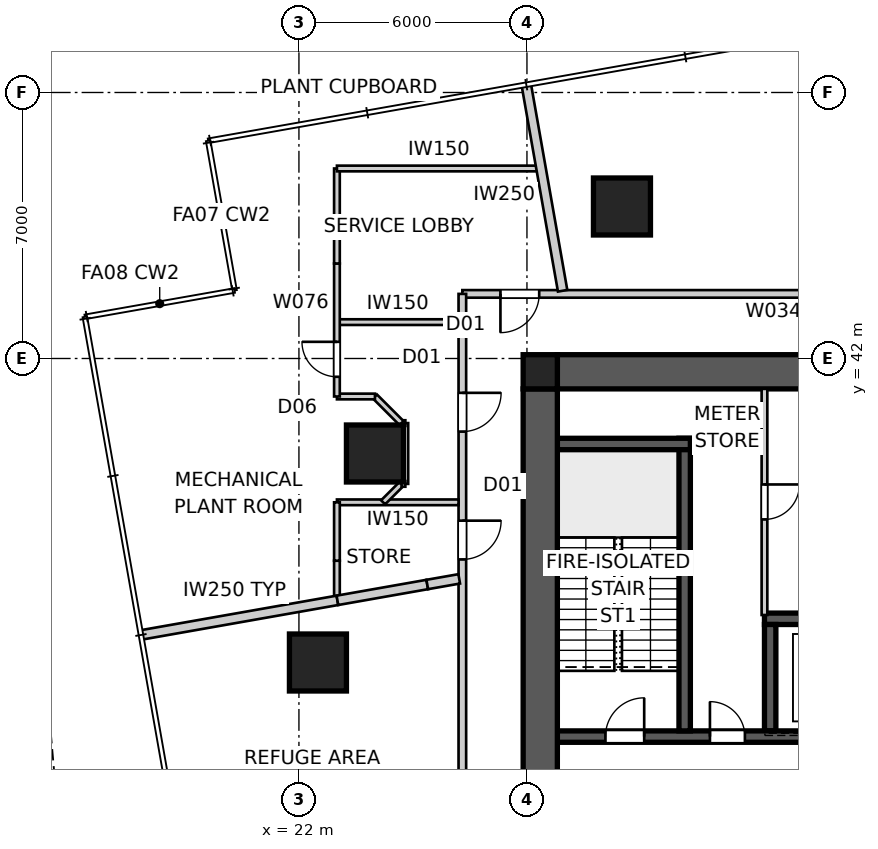
"""IFC4 building model, lengths in metres.
Left out: names, types, materials, properties, quantities, classifications, styles, units other than length and angle.
Written with IfcOpenShell. Run it as: python <this file> out.ifc"""

import sys

from ifc_helpers import new_model, si_unit, direction, frame, frame_2d, origin, origin_2d, place, context, subcontext, project, spatial, polyline, rectangle, outline, extrude, element, fill, save


model = new_model("IFC4")
c1 = context("Model", 3, precision=1e-05, world=origin(), true_north=direction((0.0, 1.0)))
c2 = subcontext(c1, "Body", "Model", "MODEL_VIEW")
j1 = project(units=[si_unit("LENGTHUNIT", "METRE"), si_unit("PLANEANGLEUNIT", "RADIAN")], contexts=[c1])
p1 = place(None, origin())
s1 = spatial("IfcSite", under=j1, at=p1, CompositionType="ELEMENT")
p2 = place(p1, origin())
s2 = spatial("IfcBuilding", under=s1, at=p2, CompositionType="ELEMENT")
p3 = place(p2, frame((0.0, 0.0, 74.4)))
s3 = spatial("IfcBuildingStorey", under=s2, at=p3, CompositionType="ELEMENT", Elevation=74.4)
p4 = place(p3, frame((28.8, 41.65, 0.0), z_axis=(0.0, 0.0, 1.0), x_axis=(1.0, 0.0, 0.0)))
e1 = element("IfcWall", 1, at=p4, inside=s3, PredefinedType="SHEAR", context=c2, shape_type="SweptSolid", body=[
    extrude(outline(polyline([(0.0, -0.45), (22.4, -0.45), (22.4, -0.025), (22.85, -0.025), (22.85, 0.025), (22.4, 0.025), (22.4, 0.45), (0.0, 0.45), (0.0, 0.025), (-0.45, 0.025), (-0.45, -0.025), (0.0, -0.025), (0.0, -0.45)])), origin(), (0.0, 0.0, 1.0), 5.0),
])
p5 = place(p3, frame((28.35, 41.2, 0.0), z_axis=(0.0, 0.0, 1.0), x_axis=(0.0, -1.0, 0.0)))
e2 = element("IfcWall", 2, at=p5, inside=s3, PredefinedType="SHEAR", context=c2, shape_type="SweptSolid", body=[
    extrude(outline(polyline([(0.0, -0.45), (22.4, -0.45), (22.4, -0.025), (22.85, -0.025), (22.85, 0.025), (22.4, 0.025), (22.4, 0.45), (0.0, 0.45), (0.0, 0.025), (-0.45, 0.025), (-0.45, -0.025), (0.0, -0.025), (0.0, -0.45)])), origin(), (0.0, 0.0, 1.0), 5.0),
])
p6 = place(p5, frame((11.14, 0.0, 0.0)))
e3 = element("IfcOpeningElement", 3, at=p6, cuts=e2, PredefinedType="OPENING", context=c2, shape_type="SweptSolid", body=[
    extrude(rectangle(XDim=1.02, YDim=2.4, at=frame_2d((0.51, 1.2))), frame((0.0, 0.46, 0.0), z_axis=(0.0, -1.0, 0.0), x_axis=(1.0, 0.0, 0.0)), (0.0, 0.0, 1.0), 0.92),
])
p7 = place(p3, frame((28.8, 32.05, 0.0), z_axis=(0.0, 0.0, 1.0), x_axis=(1.0, 0.0, 0.0)))
e4 = element("IfcWall", 4, at=p7, inside=s3, PredefinedType="SHEAR", context=c2, shape_type="SweptSolid", body=[
    extrude(rectangle(XDim=22.4, YDim=0.3, at=frame_2d((11.2, 0.0))), origin(), (0.0, 0.0, 1.0), 5.0),
])
p8 = place(p7, frame((19.04, 0.0, 0.0)))
e5 = element("IfcOpeningElement", 5, at=p8, cuts=e4, PredefinedType="OPENING", context=c2, shape_type="SweptSolid", body=[
    extrude(rectangle(XDim=0.92, YDim=2.1, at=frame_2d((0.46, 1.05))), frame((0.0, 0.16, 0.0), z_axis=(0.0, -1.0, 0.0), x_axis=(1.0, 0.0, 0.0)), (0.0, 0.0, 1.0), 0.32),
])
p9 = place(p7, frame((1.265, 0.0, 0.0)))
e6 = element("IfcOpeningElement", 6, at=p9, cuts=e4, PredefinedType="OPENING", context=c2, shape_type="SweptSolid", body=[
    extrude(rectangle(XDim=1.02, YDim=2.1, at=frame_2d((0.51, 1.05))), frame((0.0, 0.16, 0.0), z_axis=(0.0, -1.0, 0.0), x_axis=(1.0, 0.0, 0.0)), (0.0, 0.0, 1.0), 0.32),
])
p10 = place(p7, frame((4.015, 0.0, 0.0)))
e7 = element("IfcOpeningElement", 7, at=p10, cuts=e4, PredefinedType="OPENING", context=c2, shape_type="SweptSolid", body=[
    extrude(rectangle(XDim=0.92, YDim=2.1, at=frame_2d((0.46, 1.05))), frame((0.0, 0.16, 0.0), z_axis=(0.0, -1.0, 0.0), x_axis=(1.0, 0.0, 0.0)), (0.0, 0.0, 1.0), 0.32),
])
p11 = place(p7, frame((6.45, 0.0, 0.0)))
e8 = element("IfcOpeningElement", 8, at=p11, cuts=e4, PredefinedType="OPENING", context=c2, shape_type="SweptSolid", body=[
    extrude(rectangle(XDim=1.1, YDim=2.1, at=frame_2d((0.55, 1.05))), frame((0.0, 0.16, 0.0), z_axis=(0.0, -1.0, 0.0), x_axis=(1.0, 0.0, 0.0)), (0.0, 0.0, 1.0), 0.32),
])
p12 = place(p7, frame((9.25, 0.0, 0.0)))
e9 = element("IfcOpeningElement", 9, at=p12, cuts=e4, PredefinedType="OPENING", context=c2, shape_type="SweptSolid", body=[
    extrude(rectangle(XDim=1.1, YDim=2.1, at=frame_2d((0.55, 1.05))), frame((0.0, 0.16, 0.0), z_axis=(0.0, -1.0, 0.0), x_axis=(1.0, 0.0, 0.0)), (0.0, 0.0, 1.0), 0.32),
])
p13 = place(p7, frame((14.85, 0.0, 0.0)))
e10 = element("IfcOpeningElement", 10, at=p13, cuts=e4, PredefinedType="OPENING", context=c2, shape_type="SweptSolid", body=[
    extrude(rectangle(XDim=1.1, YDim=2.1, at=frame_2d((0.55, 1.05))), frame((0.0, 0.16, 0.0), z_axis=(0.0, -1.0, 0.0), x_axis=(1.0, 0.0, 0.0)), (0.0, 0.0, 1.0), 0.32),
])
p14 = place(p3, frame((34.25, 35.15, 0.0), z_axis=(0.0, 0.0, 1.0), x_axis=(1.0, 0.0, 0.0)))
e11 = element("IfcWall", 11, at=p14, inside=s3, PredefinedType="SHEAR", context=c2, shape_type="SweptSolid", body=[
    extrude(rectangle(XDim=11.5, YDim=0.3, at=frame_2d((5.75, 0.0))), origin(), (0.0, 0.0, 1.0), 5.0),
])
p15 = place(p3, frame((34.4, 32.2, 0.0), z_axis=(0.0, 0.0, 1.0), x_axis=(0.0, 1.0, 0.0)))
e12 = element("IfcWall", 12, at=p15, inside=s3, PredefinedType="SHEAR", context=c2, shape_type="SweptSolid", body=[
    extrude(rectangle(XDim=2.8, YDim=0.3, at=frame_2d((1.4, 0.0))), origin(), (0.0, 0.0, 1.0), 5.0),
])
p16 = place(p3, frame((32.15, 32.2, 0.0), z_axis=(0.0, 0.0, 1.0), x_axis=(0.0, 1.0, 0.0)))
e13 = element("IfcWall", 13, at=p16, inside=s3, PredefinedType="SHEAR", context=c2, shape_type="SweptSolid", body=[
    extrude(rectangle(XDim=7.7, YDim=0.3, at=frame_2d((3.85, 0.0))), origin(), (0.0, 0.0, 1.0), 5.0),
])
p17 = place(p3, frame((28.8, 39.75, 0.0), z_axis=(0.0, 0.0, 1.0), x_axis=(1.0, 0.0, 0.0)))
e14 = element("IfcWall", 14, at=p17, inside=s3, PredefinedType="SHEAR", context=c2, shape_type="SweptSolid", body=[
    extrude(rectangle(XDim=3.5, YDim=0.3, at=frame_2d((1.75, 0.0))), origin(), (0.0, 0.0, 1.0), 5.0),
])
p18 = place(p3, frame((28.35, 41.65, 0.0), z_axis=(0.0, 0.0, 1.0), x_axis=(1.0, 0.0, 0.0)))
e15 = element("IfcColumn", 15, at=p18, inside=s3, PredefinedType="COLUMN", context=c2, shape_type="SweptSolid", body=[
    extrude(rectangle(XDim=0.9, YDim=0.9, at=origin_2d()), origin(), (0.0, 0.0, 1.0), 5.0),
])
for number, where, z_axis, x_axis in (
    (16, (30.5, 46.0, 0.0), (0.0, 0.0, 1.0), (1.0, 0.0, 0.0)),
    (17, (24.0, 39.5, 0.0), (0.0, 0.0, 1.0), (1.0, 0.0, 0.0)),
    (18, (22.5, 34.0, 0.0), (0.0, 0.0, 1.0), (1.0, 0.0, 0.0)),
):
    element("IfcColumn", number, at=place(p3, frame(where, z_axis=z_axis, x_axis=x_axis)), inside=s3, PredefinedType="COLUMN", context=c2, shape_type="SweptSolid", body=[
        extrude(rectangle(XDim=1.5, YDim=1.5, at=origin_2d()), origin(), (0.0, 0.0, 1.0), 5.0),
    ])
p19 = place(p3, frame((53.7, 43.7, 0.0), z_axis=(0.0, 0.0, 1.0), x_axis=(-1.0, 0.0, 0.0)))
e19 = element("IfcWall", 19, at=p19, inside=s3, PredefinedType="PARTITIONING", context=c2, shape_type="SweptSolid", body=[
    extrude(rectangle(XDim=27.4, YDim=0.2, at=frame_2d((13.7, 0.0))), origin(), (0.0, 0.0, 1.0), 4.85),
])
p20 = place(p19, frame((12.031, 0.0, 0.0)))
e20 = element("IfcOpeningElement", 20, at=p20, cuts=e19, PredefinedType="OPENING", context=c2, shape_type="SweptSolid", body=[
    extrude(rectangle(XDim=1.02, YDim=2.34, at=frame_2d((0.51, 1.17))), frame((0.0, 0.11, 0.0), z_axis=(0.0, -1.0, 0.0), x_axis=(1.0, 0.0, 0.0)), (0.0, 0.0, 1.0), 0.22),
])
p21 = place(p19, frame((25.378, 0.0, 0.0)))
e21 = element("IfcOpeningElement", 21, at=p21, cuts=e19, PredefinedType="OPENING", context=c2, shape_type="SweptSolid", body=[
    extrude(rectangle(XDim=1.02, YDim=2.34, at=frame_2d((0.51, 1.17))), frame((0.0, 0.11, 0.0), z_axis=(0.0, -1.0, 0.0), x_axis=(1.0, 0.0, 0.0)), (0.0, 0.0, 1.0), 0.22),
])
p22 = place(p3, frame((26.3, 43.7, 0.0), z_axis=(0.0, 0.0, 1.0), x_axis=(0.0, -1.0, 0.0)))
e22 = element("IfcWall", 22, at=p22, inside=s3, PredefinedType="PARTITIONING", context=c2, shape_type="SweptSolid", body=[
    extrude(rectangle(XDim=27.4, YDim=0.2, at=frame_2d((13.7, 0.0))), origin(), (0.0, 0.0, 1.0), 4.85),
])
p23 = place(p22, frame((15.588, 0.0, 0.0)))
e23 = element("IfcOpeningElement", 23, at=p23, cuts=e22, PredefinedType="OPENING", context=c2, shape_type="SweptSolid", body=[
    extrude(rectangle(XDim=1.02, YDim=2.34, at=frame_2d((0.51, 1.17))), frame((0.0, 0.11, 0.0), z_axis=(0.0, -1.0, 0.0), x_axis=(1.0, 0.0, 0.0)), (0.0, 0.0, 1.0), 0.22),
])
p24 = place(p22, frame((2.604, 0.0, 0.0)))
e24 = element("IfcOpeningElement", 24, at=p24, cuts=e22, PredefinedType="OPENING", context=c2, shape_type="SweptSolid", body=[
    extrude(rectangle(XDim=1.02, YDim=2.34, at=frame_2d((0.51, 1.17))), frame((0.0, 0.11, 0.0), z_axis=(0.0, -1.0, 0.0), x_axis=(1.0, 0.0, 0.0)), (0.0, 0.0, 1.0), 0.22),
])
p25 = place(p22, frame((25.378, 0.0, 0.0)))
e25 = element("IfcOpeningElement", 25, at=p25, cuts=e22, PredefinedType="OPENING", context=c2, shape_type="SweptSolid", body=[
    extrude(rectangle(XDim=1.02, YDim=2.34, at=frame_2d((0.51, 1.17))), frame((0.0, 0.11, 0.0), z_axis=(0.0, -1.0, 0.0), x_axis=(1.0, 0.0, 0.0)), (0.0, 0.0, 1.0), 0.22),
])
p26 = place(p22, frame((5.968, 0.0, 0.0)))
e26 = element("IfcOpeningElement", 26, at=p26, cuts=e22, PredefinedType="OPENING", context=c2, shape_type="SweptSolid", body=[
    extrude(rectangle(XDim=1.02, YDim=2.34, at=frame_2d((0.51, 1.17))), frame((0.0, 0.11, 0.0), z_axis=(0.0, -1.0, 0.0), x_axis=(1.0, 0.0, 0.0)), (0.0, 0.0, 1.0), 0.22),
])
p27 = place(p3, frame((27.982, 49.205, 0.0), z_axis=(0.0, 0.0, 1.0), x_axis=(0.173674040102, -0.984803192417, 0.0)))
e27 = element("IfcWall", 27, at=p27, inside=s3, PredefinedType="PARTITIONING", context=c2, shape_type="SweptSolid", body=[
    extrude(rectangle(XDim=5.506, YDim=0.25, at=frame_2d((2.753, 0.0))), origin(), (0.0, 0.0, 1.0), 4.85),
])
p28 = place(p3, frame((17.843, 34.724, 0.0), z_axis=(0.0, 0.0, 1.0), x_axis=(0.984813509266, 0.173615529166, 0.0)))
e28 = element("IfcWall", 28, at=p28, inside=s3, PredefinedType="PARTITIONING", context=c2, shape_type="SweptSolid", body=[
    extrude(rectangle(XDim=5.25, YDim=0.25, at=frame_2d((2.625, 0.0))), origin(), (0.0, 0.0, 1.0), 4.85),
])
p29 = place(p3, frame((23.013, 35.636, 0.0), z_axis=(0.0, 0.0, 1.0), x_axis=(0.984811193906, 0.17362866226, 0.0)))
e29 = element("IfcWall", 29, at=p29, inside=s3, PredefinedType="PARTITIONING", context=c2, shape_type="SweptSolid", body=[
    extrude(rectangle(XDim=2.4, YDim=0.25, at=frame_2d((1.2, 0.0))), origin(), (0.0, 0.0, 1.0), 4.322),
])
p30 = place(p3, frame((25.376, 36.052, 0.0), z_axis=(0.0, 0.0, 1.0), x_axis=(0.984789312188, 0.173752728326, 0.0)))
e30 = element("IfcWall", 30, at=p30, inside=s3, PredefinedType="PARTITIONING", context=c2, shape_type="SweptSolid", body=[
    extrude(rectangle(XDim=0.854, YDim=0.25, at=frame_2d((0.427, 0.0))), origin(), (0.0, 0.0, 1.0), 4.85),
])
p31 = place(p3, frame((34.25, 41.2, 0.0), z_axis=(0.0, 0.0, 1.0), x_axis=(0.0, -1.0, 0.0)))
e31 = element("IfcWall", 31, at=p31, inside=s3, PredefinedType="SOLIDWALL", context=c2, shape_type="SweptSolid", body=[
    extrude(rectangle(XDim=5.95, YDim=0.15, at=frame_2d((2.975, 0.0))), origin(), (0.0, 0.0, 1.0), 4.85),
])
p32 = place(p31, frame((2.515, 0.0, 0.0)))
e32 = element("IfcOpeningElement", 32, at=p32, cuts=e31, PredefinedType="OPENING", context=c2, shape_type="SweptSolid", body=[
    extrude(rectangle(XDim=0.92, YDim=2.1, at=frame_2d((0.46, 1.05))), frame((0.0, 0.085, 0.0), z_axis=(0.0, -1.0, 0.0), x_axis=(1.0, 0.0, 0.0)), (0.0, 0.0, 1.0), 0.17),
])
for number, where, z_axis, x_axis in (
    (33, (23.0, 42.957, 0.0), (0.0, 0.0, 1.0), (1.0, 0.0, 0.0)),
    (34, (26.2, 38.215, 0.0), (0.0, 0.0, 1.0), (-1.0, 0.0, 0.0)),
):
    element("IfcWall", number, at=place(p3, frame(where, z_axis=z_axis, x_axis=x_axis)), inside=s3, PredefinedType="SOLIDWALL", context=c2, shape_type="SweptSolid", body=[
        extrude(rectangle(XDim=3.2, YDim=0.15, at=frame_2d((1.6, 0.0))), origin(), (0.0, 0.0, 1.0), 4.85),
    ])
p33 = place(p3, frame((24.215, 38.215, 0.0), z_axis=(0.0, 0.0, 1.0), x_axis=(0.707106781187, 0.707106781187, 0.0)))
e35 = element("IfcWall", 35, at=p33, inside=s3, PredefinedType="SOLIDWALL", context=c2, shape_type="SweptSolid", body=[
    extrude(rectangle(XDim=0.686, YDim=0.15, at=frame_2d((0.343, 0.0))), origin(), (0.0, 0.0, 1.0), 4.85),
])
p34 = place(p3, frame((24.8, 38.7, 0.0), z_axis=(0.0, 0.0, 1.0), x_axis=(0.0, 1.0, 0.0)))
e36 = element("IfcWall", 36, at=p34, inside=s3, PredefinedType="SOLIDWALL", context=c2, shape_type="SweptSolid", body=[
    extrude(rectangle(XDim=1.6, YDim=0.15, at=frame_2d((0.8, 0.0))), origin(), (0.0, 0.0, 1.0), 4.85),
])
p35 = place(p3, frame((24.7, 40.3, 0.0), z_axis=(0.0, 0.0, 1.0), x_axis=(-0.707106781187, 0.707106781187, 0.0)))
e37 = element("IfcWall", 37, at=p35, inside=s3, PredefinedType="SOLIDWALL", context=c2, shape_type="SweptSolid", body=[
    extrude(rectangle(XDim=0.99, YDim=0.15, at=frame_2d((0.495, 0.0))), origin(), (0.0, 0.0, 1.0), 4.85),
])
p36 = place(p3, frame((24.0, 41.0, 0.0), z_axis=(0.0, 0.0, 1.0), x_axis=(-1.0, 0.0, 0.0)))
e38 = element("IfcWall", 38, at=p36, inside=s3, PredefinedType="SOLIDWALL", context=c2, shape_type="SweptSolid", body=[
    extrude(rectangle(XDim=1.0, YDim=0.15, at=frame_2d((0.5, 0.0))), origin(), (0.0, 0.0, 1.0), 4.85),
])
p37 = place(p3, frame((23.0, 41.0, 0.0), z_axis=(0.0, 0.0, 1.0), x_axis=(0.0, 1.0, 0.0)))
e39 = element("IfcWall", 39, at=p37, inside=s3, PredefinedType="SOLIDWALL", context=c2, shape_type="SweptSolid", body=[
    extrude(rectangle(XDim=3.5, YDim=0.15, at=frame_2d((1.75, 0.0))), origin(), (0.0, 0.0, 1.0), 4.85),
])
p38 = place(p37, frame((0.519, 0.0, 0.0)))
e40 = element("IfcOpeningElement", 40, at=p38, cuts=e39, PredefinedType="OPENING", context=c2, shape_type="SweptSolid", body=[
    extrude(rectangle(XDim=0.92, YDim=2.1, at=frame_2d((0.46, 1.05))), frame((0.0, 0.085, 0.0), z_axis=(0.0, -1.0, 0.0), x_axis=(1.0, 0.0, 0.0)), (0.0, 0.0, 1.0), 0.17),
])
p39 = place(p3, frame((23.0, 44.5, 0.0), z_axis=(0.0, 0.0, 1.0), x_axis=(0.0, 1.0, 0.0)))
e41 = element("IfcWall", 41, at=p39, inside=s3, PredefinedType="SOLIDWALL", context=c2, shape_type="SweptSolid", body=[
    extrude(rectangle(XDim=2.5, YDim=0.15, at=frame_2d((1.25, 0.0))), origin(), (0.0, 0.0, 1.0), 4.049),
])
p40 = place(p3, frame((23.0, 47.0, 0.0), z_axis=(0.0, 0.0, 1.0), x_axis=(1.0, 0.0, 0.0)))
e42 = element("IfcWall", 42, at=p40, inside=s3, PredefinedType="SOLIDWALL", context=c2, shape_type="SweptSolid", body=[
    extrude(rectangle(XDim=5.371, YDim=0.15, at=frame_2d((2.686, 0.0))), origin(), (0.0, 0.0, 1.0), 4.85),
])
p41 = place(p3, frame((23.0, 35.634, 0.0), z_axis=(0.0, 0.0, 1.0), x_axis=(0.0, 1.0, 0.0)))
e43 = element("IfcWall", 43, at=p41, inside=s3, PredefinedType="SOLIDWALL", context=c2, shape_type="SweptSolid", body=[
    extrude(rectangle(XDim=1.045, YDim=0.15, at=frame_2d((0.522, 0.0))), origin(), (0.0, 0.0, 1.0), 3.85),
])
p42 = place(p3, frame((23.0, 36.678, 0.0), z_axis=(0.0, 0.0, 1.0), x_axis=(0.0, 1.0, 0.0)))
e44 = element("IfcWall", 44, at=p42, inside=s3, PredefinedType="SOLIDWALL", context=c2, shape_type="SweptSolid", body=[
    extrude(rectangle(XDim=1.537, YDim=0.15, at=frame_2d((0.768, 0.0))), origin(), (0.0, 0.0, 1.0), 4.85),
])
for number, where, z_axis, x_axis in (
    (45, (24.8, 38.7, 0.0), (0.0, 0.0, 1.0), (-1.0, 0.0, 0.0)),
    (46, (24.8, 40.3, 0.0), (0.0, 0.0, 1.0), (-1.0, 0.0, 0.0)),
):
    element("IfcWall", number, at=place(p3, frame(where, z_axis=z_axis, x_axis=x_axis)), inside=s3, PredefinedType="SOLIDWALL", context=c2, shape_type="SweptSolid", body=[
        extrude(rectangle(XDim=0.1, YDim=0.15, at=frame_2d((0.05, 0.0))), origin(), (0.0, 0.0, 1.0), 4.85),
    ])
p43 = place(p9, origin())
e47 = element("IfcDoor", 47, at=p43, inside=s3, OperationType="SINGLE_SWING_RIGHT", PredefinedType="DOOR", context=c2, shape_type="SweptSolid", body=[
    extrude(rectangle(XDim=1.02, YDim=2.1, at=frame_2d((0.51, 1.05))), frame((0.0, 0.025, 0.0), z_axis=(0.0, -1.0, 0.0), x_axis=(1.0, 0.0, 0.0)), (0.0, 0.0, 1.0), 0.05),
])
fill(e6, e47)
p44 = place(p10, origin())
e48 = element("IfcDoor", 48, at=p44, inside=s3, OperationType="SINGLE_SWING_LEFT", PredefinedType="DOOR", context=c2, shape_type="SweptSolid", body=[
    extrude(rectangle(XDim=0.92, YDim=2.1, at=frame_2d((0.46, 1.05))), frame((0.0, 0.025, 0.0), z_axis=(0.0, -1.0, 0.0), x_axis=(1.0, 0.0, 0.0)), (0.0, 0.0, 1.0), 0.05),
])
fill(e7, e48)
p45 = place(p24, origin())
e49 = element("IfcDoor", 49, at=p45, inside=s3, OperationType="SINGLE_SWING_LEFT", PredefinedType="DOOR", context=c2, shape_type="SweptSolid", body=[
    extrude(rectangle(XDim=1.02, YDim=2.34, at=frame_2d((0.51, 1.17))), frame((0.0, 0.025, 0.0), z_axis=(0.0, -1.0, 0.0), x_axis=(1.0, 0.0, 0.0)), (0.0, 0.0, 1.0), 0.05),
])
fill(e24, e49)
p46 = place(p21, origin())
e50 = element("IfcDoor", 50, at=p46, inside=s3, OperationType="SINGLE_SWING_RIGHT", PredefinedType="DOOR", context=c2, shape_type="SweptSolid", body=[
    extrude(rectangle(XDim=1.02, YDim=2.34, at=frame_2d((0.51, 1.17))), frame((0.0, 0.025, 0.0), z_axis=(0.0, -1.0, 0.0), x_axis=(1.0, 0.0, 0.0)), (0.0, 0.0, 1.0), 0.05),
])
fill(e21, e50)
p47 = place(p26, origin())
e51 = element("IfcDoor", 51, at=p47, inside=s3, OperationType="SINGLE_SWING_LEFT", PredefinedType="DOOR", context=c2, shape_type="SweptSolid", body=[
    extrude(rectangle(XDim=1.02, YDim=2.34, at=frame_2d((0.51, 1.17))), frame((0.0, 0.025, 0.0), z_axis=(0.0, -1.0, 0.0), x_axis=(1.0, 0.0, 0.0)), (0.0, 0.0, 1.0), 0.05),
])
fill(e26, e51)
p48 = place(p32, origin())
e52 = element("IfcDoor", 52, at=p48, inside=s3, OperationType="SINGLE_SWING_LEFT", PredefinedType="DOOR", context=c2, shape_type="SweptSolid", body=[
    extrude(rectangle(XDim=0.92, YDim=2.1, at=frame_2d((0.46, 1.05))), frame((0.0, 0.025, 0.0), z_axis=(0.0, -1.0, 0.0), x_axis=(1.0, 0.0, 0.0)), (0.0, 0.0, 1.0), 0.05),
])
fill(e32, e52)
p49 = place(p38, origin())
e53 = element("IfcDoor", 53, at=p49, inside=s3, OperationType="SINGLE_SWING_RIGHT", PredefinedType="DOOR", context=c2, shape_type="SweptSolid", body=[
    extrude(rectangle(XDim=0.92, YDim=2.1, at=frame_2d((0.46, 1.05))), frame((0.0, 0.025, 0.0), z_axis=(0.0, -1.0, 0.0), x_axis=(1.0, 0.0, 0.0)), (0.0, 0.0, 1.0), 0.05),
])
fill(e40, e53)
save(model, sys.argv[1])
